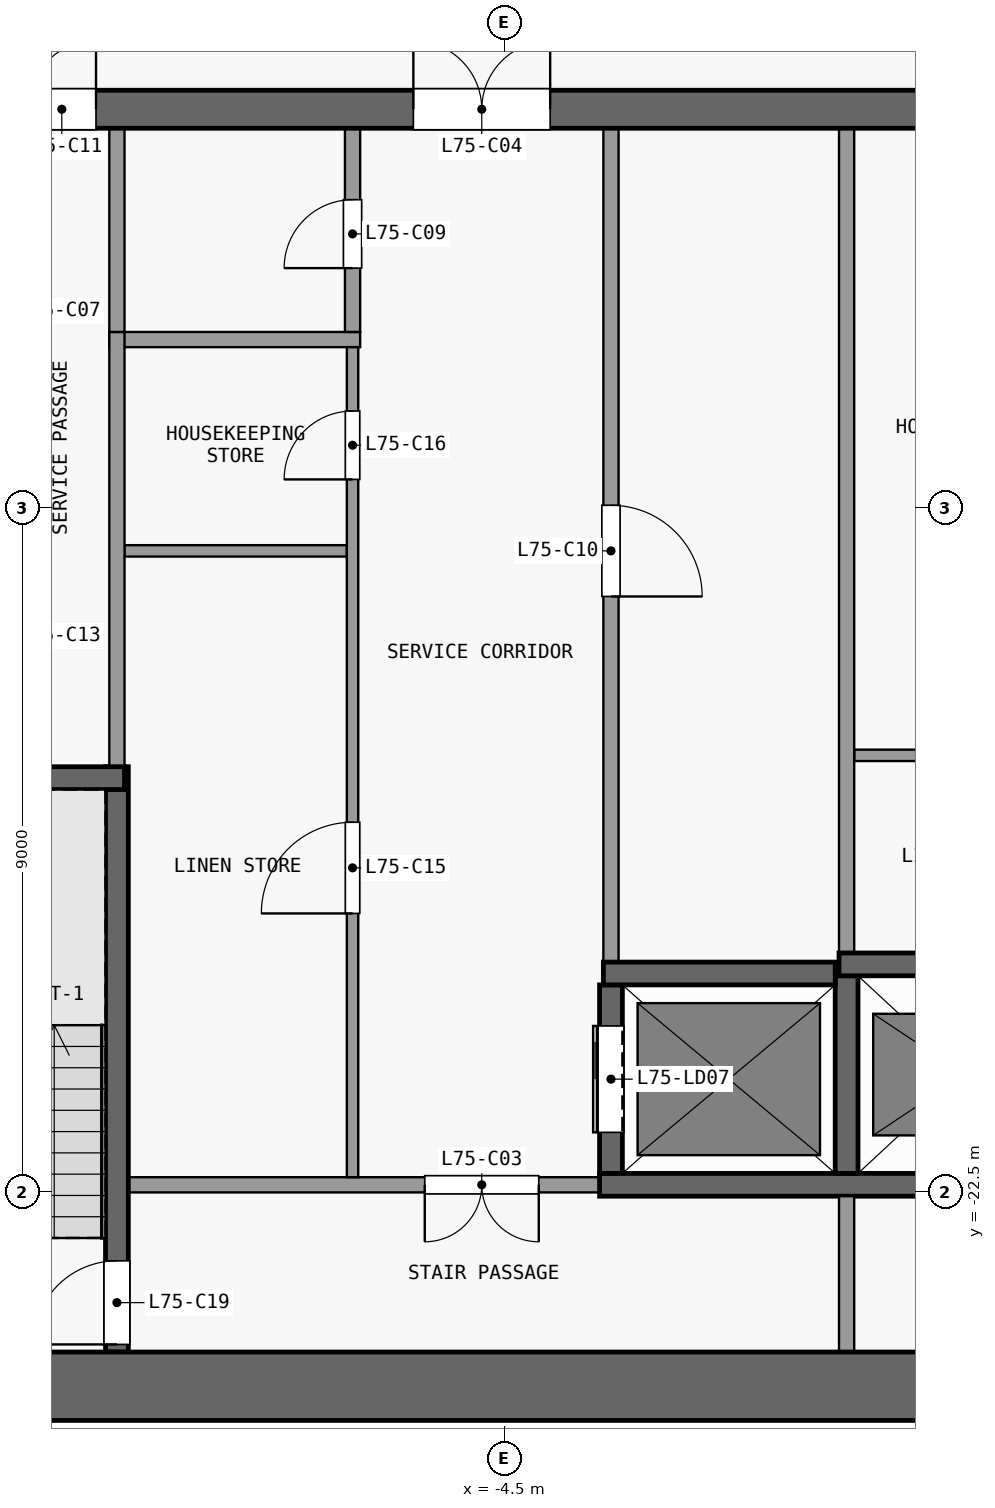
"""IFC4 building model, lengths in metres.
Left out: names, types, materials, properties, quantities, classifications, styles, units other than length and angle.
Written with IfcOpenShell. Run it as: python <this file> out.ifc"""

import sys

from ifc_helpers import new_model, si_unit, direction, frame, frame_2d, origin, place, context, subcontext, project, spatial, rectangle, extrude, element, fill, save


model = new_model("IFC4")
c1 = context("Model", 3, precision=1e-05, world=origin(), true_north=direction((0.0, 1.0)))
c2 = subcontext(c1, "Body", "Model", "MODEL_VIEW")
j1 = project(units=[si_unit("LENGTHUNIT", "METRE"), si_unit("PLANEANGLEUNIT", "RADIAN")], contexts=[c1])
p1 = place(None, origin())
s1 = spatial("IfcSite", under=j1, at=p1, CompositionType="ELEMENT")
p2 = place(p1, origin())
s2 = spatial("IfcBuilding", under=s1, at=p2, CompositionType="ELEMENT")
p3 = place(p2, frame((0.0, 0.0, 295.1)))
s3 = spatial("IfcBuildingStorey", under=s2, at=p3, CompositionType="ELEMENT", Elevation=295.1)
p4 = place(p3, frame((-13.1, -25.05, 0.0), z_axis=(0.0, 0.0, 1.0), x_axis=(1.0, 0.0, 0.0)))
e1 = element("IfcWall", 1, at=p4, inside=s3, PredefinedType="SHEAR", context=c2, shape_type="SweptSolid", body=[
    extrude(rectangle(XDim=26.2, YDim=0.9, at=frame_2d((13.1, 0.0))), origin(), (0.0, 0.0, 1.0), 3.2),
])
p5 = place(p3, frame((-13.1, -8.25, 0.0), z_axis=(0.0, 0.0, 1.0), x_axis=(1.0, 0.0, 0.0)))
e2 = element("IfcWall", 2, at=p5, inside=s3, PredefinedType="SHEAR", context=c2, shape_type="SweptSolid", body=[
    extrude(rectangle(XDim=26.2, YDim=0.5, at=frame_2d((13.1, 0.0))), origin(), (0.0, 0.0, 1.0), 3.2),
])
p6 = place(p5, frame((7.4, 0.0, 0.0)))
e3 = element("IfcOpeningElement", 3, at=p6, cuts=e2, PredefinedType="OPENING", context=c2, shape_type="SweptSolid", body=[
    extrude(rectangle(XDim=1.8, YDim=2.1, at=frame_2d((0.9, 1.05))), frame((0.0, 0.26, 0.0), z_axis=(0.0, -1.0, 0.0), x_axis=(1.0, 0.0, 0.0)), (0.0, 0.0, 1.0), 0.52),
])
p7 = place(p5, frame((17.0, 0.0, 0.0)))
e4 = element("IfcOpeningElement", 4, at=p7, cuts=e2, PredefinedType="OPENING", context=c2, shape_type="SweptSolid", body=[
    extrude(rectangle(XDim=1.8, YDim=2.1, at=frame_2d((0.9, 1.05))), frame((0.0, 0.26, 0.0), z_axis=(0.0, -1.0, 0.0), x_axis=(1.0, 0.0, 0.0)), (0.0, 0.0, 1.0), 0.52),
])
p8 = place(p5, frame((2.325, 0.0, 0.0)))
e5 = element("IfcOpeningElement", 5, at=p8, cuts=e2, PredefinedType="OPENING", context=c2, shape_type="SweptSolid", body=[
    extrude(rectangle(XDim=0.9, YDim=2.1, at=frame_2d((0.45, 1.05))), frame((0.0, 0.26, 0.0), z_axis=(0.0, -1.0, 0.0), x_axis=(1.0, 0.0, 0.0)), (0.0, 0.0, 1.0), 0.52),
])
p9 = place(p5, frame((22.975, 0.0, 0.0)))
e6 = element("IfcOpeningElement", 6, at=p9, cuts=e2, PredefinedType="OPENING", context=c2, shape_type="SweptSolid", body=[
    extrude(rectangle(XDim=0.9, YDim=2.1, at=frame_2d((0.45, 1.05))), frame((0.0, 0.26, 0.0), z_axis=(0.0, -1.0, 0.0), x_axis=(1.0, 0.0, 0.0)), (0.0, 0.0, 1.0), 0.52),
])
p10 = place(p3, frame((-3.25, -22.4, 0.0), z_axis=(0.0, 0.0, 1.0), x_axis=(-1.0, 0.0, 0.0)))
e7 = element("IfcWall", 7, at=p10, inside=s3, PredefinedType="PARTITIONING", context=c2, shape_type="SweptSolid", body=[
    extrude(rectangle(XDim=6.2, YDim=0.2, at=frame_2d((3.1, 0.0))), origin(), (0.0, 0.0, 1.0), 3.2),
])
p11 = place(p10, frame((0.8, 0.0, 0.0)))
e8 = element("IfcOpeningElement", 8, at=p11, cuts=e7, PredefinedType="OPENING", context=c2, shape_type="SweptSolid", body=[
    extrude(rectangle(XDim=1.5, YDim=2.1, at=frame_2d((0.75, 1.05))), frame((0.0, 0.11, 0.0), z_axis=(0.0, -1.0, 0.0), x_axis=(1.0, 0.0, 0.0)), (0.0, 0.0, 1.0), 0.22),
])
p12 = place(p3, frame((-3.25, -22.4, 0.0), z_axis=(0.0, 0.0, 1.0), x_axis=(1.0, 0.0, 0.0)))
e9 = element("IfcWall", 9, at=p12, inside=s3, PredefinedType="SHEAR", context=c2, shape_type="SweptSolid", body=[
    extrude(rectangle(XDim=6.5, YDim=0.3, at=frame_2d((3.25, 0.0))), origin(), (0.0, 0.0, 1.0), 3.2),
])
p13 = place(p3, frame((-3.2, -19.62, 0.0), z_axis=(0.0, 0.0, 1.0), x_axis=(1.0, 0.0, 0.0)))
e10 = element("IfcWall", 10, at=p13, inside=s3, PredefinedType="SHEAR", context=c2, shape_type="SweptSolid", body=[
    extrude(rectangle(XDim=3.05, YDim=0.3, at=frame_2d((1.525, 0.0))), origin(), (0.0, 0.0, 1.0), 3.2),
])
p14 = place(p3, frame((-0.1, -19.5, 0.0), z_axis=(0.0, 0.0, 1.0), x_axis=(1.0, 0.0, 0.0)))
e11 = element("IfcWall", 11, at=p14, inside=s3, PredefinedType="SHEAR", context=c2, shape_type="SweptSolid", body=[
    extrude(rectangle(XDim=3.275, YDim=0.3, at=frame_2d((1.638, 0.0))), origin(), (0.0, 0.0, 1.0), 3.2),
])
p15 = place(p3, frame((-12.6, -17.05, 0.0), z_axis=(0.0, 0.0, 1.0), x_axis=(1.0, 0.0, 0.0)))
e12 = element("IfcWall", 12, at=p15, inside=s3, PredefinedType="SHEAR", context=c2, shape_type="SweptSolid", body=[
    extrude(rectangle(XDim=3.1, YDim=0.3, at=frame_2d((1.55, 0.0))), origin(), (0.0, 0.0, 1.0), 3.2),
])
p16 = place(p3, frame((0.1, -16.75, 0.0), z_axis=(0.0, 0.0, 1.0), x_axis=(1.0, 0.0, 0.0)))
e13 = element("IfcWall", 13, at=p16, inside=s3, PredefinedType="PARTITIONING", context=c2, shape_type="SweptSolid", body=[
    extrude(rectangle(XDim=2.925, YDim=0.15, at=frame_2d((1.462, 0.0))), origin(), (0.0, 0.0, 1.0), 3.2),
])
p17 = place(p3, frame((-9.5, -14.06, 0.0), z_axis=(0.0, 0.0, 1.0), x_axis=(1.0, 0.0, 0.0)))
e14 = element("IfcWall", 14, at=p17, inside=s3, PredefinedType="PARTITIONING", context=c2, shape_type="SweptSolid", body=[
    extrude(rectangle(XDim=2.925, YDim=0.15, at=frame_2d((1.462, 0.0))), origin(), (0.0, 0.0, 1.0), 3.2),
])
p18 = place(p3, frame((-9.7, -11.28, 0.0), z_axis=(0.0, 0.0, 1.0), x_axis=(1.0, 0.0, 0.0)))
e15 = element("IfcWall", 15, at=p18, inside=s3, PredefinedType="PARTITIONING", context=c2, shape_type="SweptSolid", body=[
    extrude(rectangle(XDim=3.3, YDim=0.2, at=frame_2d((1.65, 0.0))), origin(), (0.0, 0.0, 1.0), 3.2),
])
p19 = place(p3, frame((-9.6, -24.6, 0.0), z_axis=(0.0, 0.0, 1.0), x_axis=(0.0, 1.0, 0.0)))
e16 = element("IfcWall", 16, at=p19, inside=s3, PredefinedType="SHEAR", context=c2, shape_type="SweptSolid", body=[
    extrude(rectangle(XDim=7.7, YDim=0.3, at=frame_2d((3.85, 0.0))), origin(), (0.0, 0.0, 1.0), 3.2),
])
p20 = place(p19, frame((0.1, 0.0, 0.0)))
e17 = element("IfcOpeningElement", 17, at=p20, cuts=e16, PredefinedType="OPENING", context=c2, shape_type="SweptSolid", body=[
    extrude(rectangle(XDim=1.1, YDim=2.1, at=frame_2d((0.55, 1.05))), frame((0.0, 0.16, 0.0), z_axis=(0.0, -1.0, 0.0), x_axis=(1.0, 0.0, 0.0)), (0.0, 0.0, 1.0), 0.32),
])
p21 = place(p3, frame((-9.6, -16.9, 0.0), z_axis=(0.0, 0.0, 1.0), x_axis=(0.0, 1.0, 0.0)))
e18 = element("IfcWall", 18, at=p21, inside=s3, PredefinedType="PARTITIONING", context=c2, shape_type="SweptSolid", body=[
    extrude(rectangle(XDim=5.72, YDim=0.2, at=frame_2d((2.86, 0.0))), origin(), (0.0, 0.0, 1.0), 3.2),
])
p22 = place(p3, frame((-9.6, -11.18, 0.0), z_axis=(0.0, 0.0, 1.0), x_axis=(0.0, 1.0, 0.0)))
e19 = element("IfcWall", 19, at=p22, inside=s3, PredefinedType="PARTITIONING", context=c2, shape_type="SweptSolid", body=[
    extrude(rectangle(XDim=2.68, YDim=0.2, at=frame_2d((1.34, 0.0))), origin(), (0.0, 0.0, 1.0), 3.2),
])
p23 = place(p3, frame((-6.5, -22.3, 0.0), z_axis=(0.0, 0.0, 1.0), x_axis=(0.0, 1.0, 0.0)))
e20 = element("IfcWall", 20, at=p23, inside=s3, PredefinedType="PARTITIONING", context=c2, shape_type="SweptSolid", body=[
    extrude(rectangle(XDim=10.92, YDim=0.15, at=frame_2d((5.46, 0.0))), origin(), (0.0, 0.0, 1.0), 3.2),
])
p24 = place(p23, frame((3.47, 0.0, 0.0)))
e21 = element("IfcOpeningElement", 21, at=p24, cuts=e20, PredefinedType="OPENING", context=c2, shape_type="SweptSolid", body=[
    extrude(rectangle(XDim=1.2, YDim=2.1, at=frame_2d((0.6, 1.05))), frame((0.0, 0.085, 0.0), z_axis=(0.0, -1.0, 0.0), x_axis=(1.0, 0.0, 0.0)), (0.0, 0.0, 1.0), 0.17),
])
p25 = place(p23, frame((9.18, 0.0, 0.0)))
e22 = element("IfcOpeningElement", 22, at=p25, cuts=e20, PredefinedType="OPENING", context=c2, shape_type="SweptSolid", body=[
    extrude(rectangle(XDim=0.9, YDim=2.1, at=frame_2d((0.45, 1.05))), frame((0.0, 0.085, 0.0), z_axis=(0.0, -1.0, 0.0), x_axis=(1.0, 0.0, 0.0)), (0.0, 0.0, 1.0), 0.17),
])
p26 = place(p3, frame((-6.5, -11.18, 0.0), z_axis=(0.0, 0.0, 1.0), x_axis=(0.0, 1.0, 0.0)))
e23 = element("IfcWall", 23, at=p26, inside=s3, PredefinedType="PARTITIONING", context=c2, shape_type="SweptSolid", body=[
    extrude(rectangle(XDim=2.68, YDim=0.2, at=frame_2d((1.34, 0.0))), origin(), (0.0, 0.0, 1.0), 3.2),
])
p27 = place(p26, frame((0.84, 0.0, 0.0)))
e24 = element("IfcOpeningElement", 24, at=p27, cuts=e23, PredefinedType="OPENING", context=c2, shape_type="SweptSolid", body=[
    extrude(rectangle(XDim=0.9, YDim=2.1, at=frame_2d((0.45, 1.05))), frame((0.0, 0.11, 0.0), z_axis=(0.0, -1.0, 0.0), x_axis=(1.0, 0.0, 0.0)), (0.0, 0.0, 1.0), 0.22),
])
p28 = place(p3, frame((-3.1, -22.25, 0.0), z_axis=(0.0, 0.0, 1.0), x_axis=(0.0, 1.0, 0.0)))
e25 = element("IfcWall", 25, at=p28, inside=s3, PredefinedType="SHEAR", context=c2, shape_type="SweptSolid", body=[
    extrude(rectangle(XDim=2.48, YDim=0.3, at=frame_2d((1.24, 0.0))), origin(), (0.0, 0.0, 1.0), 3.2),
])
p29 = place(p28, frame((0.54, 0.0, 0.0)))
e26 = element("IfcOpeningElement", 26, at=p29, cuts=e25, PredefinedType="OPENING", context=c2, shape_type="SweptSolid", body=[
    extrude(rectangle(XDim=1.4, YDim=2.1, at=frame_2d((0.7, 1.05))), frame((0.0, 0.16, 0.0), z_axis=(0.0, -1.0, 0.0), x_axis=(1.0, 0.0, 0.0)), (0.0, 0.0, 1.0), 0.32),
])
p30 = place(p3, frame((-3.1, -8.5, 0.0), z_axis=(0.0, 0.0, 1.0), x_axis=(0.0, -1.0, 0.0)))
e27 = element("IfcWall", 27, at=p30, inside=s3, PredefinedType="PARTITIONING", context=c2, shape_type="SweptSolid", body=[
    extrude(rectangle(XDim=10.97, YDim=0.2, at=frame_2d((5.485, 0.0))), origin(), (0.0, 0.0, 1.0), 3.2),
])
p31 = place(p30, frame((4.96, 0.0, 0.0)))
e28 = element("IfcOpeningElement", 28, at=p31, cuts=e27, PredefinedType="OPENING", context=c2, shape_type="SweptSolid", body=[
    extrude(rectangle(XDim=1.2, YDim=2.1, at=frame_2d((0.6, 1.05))), frame((0.0, 0.11, 0.0), z_axis=(0.0, -1.0, 0.0), x_axis=(1.0, 0.0, 0.0)), (0.0, 0.0, 1.0), 0.22),
])
p32 = place(p3, frame((0.0, -24.6, 0.0), z_axis=(0.0, 0.0, 1.0), x_axis=(0.0, 1.0, 0.0)))
e29 = element("IfcWall", 29, at=p32, inside=s3, PredefinedType="PARTITIONING", context=c2, shape_type="SweptSolid", body=[
    extrude(rectangle(XDim=2.05, YDim=0.2, at=frame_2d((1.025, 0.0))), origin(), (0.0, 0.0, 1.0), 3.2),
])
p33 = place(p3, frame((0.0, -22.25, 0.0), z_axis=(0.0, 0.0, 1.0), x_axis=(0.0, 1.0, 0.0)))
e30 = element("IfcWall", 30, at=p33, inside=s3, PredefinedType="SHEAR", context=c2, shape_type="SweptSolid", body=[
    extrude(rectangle(XDim=2.6, YDim=0.3, at=frame_2d((1.3, 0.0))), origin(), (0.0, 0.0, 1.0), 3.2),
])
p34 = place(p3, frame((0.0, -19.35, 0.0), z_axis=(0.0, 0.0, 1.0), x_axis=(0.0, 1.0, 0.0)))
e31 = element("IfcWall", 31, at=p34, inside=s3, PredefinedType="PARTITIONING", context=c2, shape_type="SweptSolid", body=[
    extrude(rectangle(XDim=10.85, YDim=0.2, at=frame_2d((5.425, 0.0))), origin(), (0.0, 0.0, 1.0), 3.2),
])
p35 = place(p29, origin())
e32 = element("IfcDoor", 32, at=p35, inside=s3, OperationType="DOUBLE_DOOR_SLIDING", PredefinedType="DOOR", context=c2, shape_type="SweptSolid", body=[
    extrude(rectangle(XDim=1.4, YDim=2.1, at=frame_2d((0.7, 1.05))), frame((0.0, 0.025, 0.0), z_axis=(0.0, -1.0, 0.0), x_axis=(1.0, 0.0, 0.0)), (0.0, 0.0, 1.0), 0.05),
])
fill(e26, e32)
p36 = place(p11, origin())
e33 = element("IfcDoor", 33, at=p36, inside=s3, OperationType="DOUBLE_DOOR_SINGLE_SWING", PredefinedType="DOOR", context=c2, shape_type="SweptSolid", body=[
    extrude(rectangle(XDim=1.5, YDim=2.1, at=frame_2d((0.75, 1.05))), frame((0.0, 0.025, 0.0), z_axis=(0.0, -1.0, 0.0), x_axis=(1.0, 0.0, 0.0)), (0.0, 0.0, 1.0), 0.05),
])
fill(e8, e33)
p37 = place(p6, origin())
e34 = element("IfcDoor", 34, at=p37, inside=s3, OperationType="DOUBLE_DOOR_SINGLE_SWING", PredefinedType="DOOR", context=c2, shape_type="SweptSolid", body=[
    extrude(rectangle(XDim=1.8, YDim=2.1, at=frame_2d((0.9, 1.05))), frame((0.0, 0.025, 0.0), z_axis=(0.0, -1.0, 0.0), x_axis=(1.0, 0.0, 0.0)), (0.0, 0.0, 1.0), 0.05),
])
fill(e3, e34)
p38 = place(p27, origin())
e35 = element("IfcDoor", 35, at=p38, inside=s3, OperationType="SINGLE_SWING_LEFT", PredefinedType="DOOR", context=c2, shape_type="SweptSolid", body=[
    extrude(rectangle(XDim=0.9, YDim=2.1, at=frame_2d((0.45, 1.05))), frame((0.0, 0.025, 0.0), z_axis=(0.0, -1.0, 0.0), x_axis=(1.0, 0.0, 0.0)), (0.0, 0.0, 1.0), 0.05),
])
fill(e24, e35)
p39 = place(p31, origin())
e36 = element("IfcDoor", 36, at=p39, inside=s3, OperationType="SINGLE_SWING_RIGHT", PredefinedType="DOOR", context=c2, shape_type="SweptSolid", body=[
    extrude(rectangle(XDim=1.2, YDim=2.1, at=frame_2d((0.6, 1.05))), frame((0.0, 0.025, 0.0), z_axis=(0.0, -1.0, 0.0), x_axis=(1.0, 0.0, 0.0)), (0.0, 0.0, 1.0), 0.05),
])
fill(e28, e36)
p40 = place(p8, origin())
e37 = element("IfcDoor", 37, at=p40, inside=s3, OperationType="SINGLE_SWING_RIGHT", PredefinedType="DOOR", context=c2, shape_type="SweptSolid", body=[
    extrude(rectangle(XDim=0.9, YDim=2.1, at=frame_2d((0.45, 1.05))), frame((0.0, 0.025, 0.0), z_axis=(0.0, -1.0, 0.0), x_axis=(1.0, 0.0, 0.0)), (0.0, 0.0, 1.0), 0.05),
])
fill(e5, e37)
p41 = place(p24, origin())
e38 = element("IfcDoor", 38, at=p41, inside=s3, OperationType="SINGLE_SWING_LEFT", PredefinedType="DOOR", context=c2, shape_type="SweptSolid", body=[
    extrude(rectangle(XDim=1.2, YDim=2.1, at=frame_2d((0.6, 1.05))), frame((0.0, 0.025, 0.0), z_axis=(0.0, -1.0, 0.0), x_axis=(1.0, 0.0, 0.0)), (0.0, 0.0, 1.0), 0.05),
])
fill(e21, e38)
p42 = place(p25, origin())
e39 = element("IfcDoor", 39, at=p42, inside=s3, OperationType="SINGLE_SWING_LEFT", PredefinedType="DOOR", context=c2, shape_type="SweptSolid", body=[
    extrude(rectangle(XDim=0.9, YDim=2.1, at=frame_2d((0.45, 1.05))), frame((0.0, 0.025, 0.0), z_axis=(0.0, -1.0, 0.0), x_axis=(1.0, 0.0, 0.0)), (0.0, 0.0, 1.0), 0.05),
])
fill(e22, e39)
p43 = place(p20, origin())
e40 = element("IfcDoor", 40, at=p43, inside=s3, OperationType="SINGLE_SWING_LEFT", PredefinedType="DOOR", context=c2, shape_type="SweptSolid", body=[
    extrude(rectangle(XDim=1.1, YDim=2.1, at=frame_2d((0.55, 1.05))), frame((0.0, 0.025, 0.0), z_axis=(0.0, -1.0, 0.0), x_axis=(1.0, 0.0, 0.0)), (0.0, 0.0, 1.0), 0.05),
])
fill(e17, e40)
save(model, sys.argv[1])
